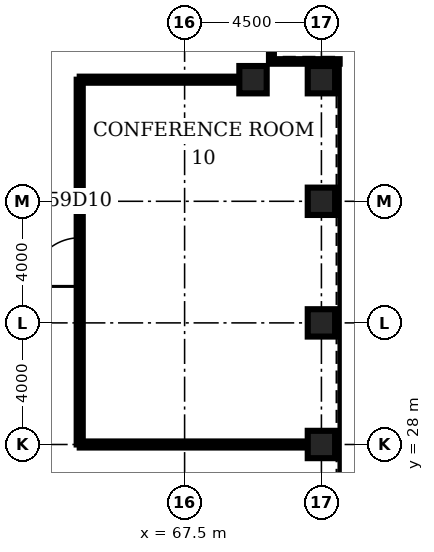
"""IFC4 building model, lengths in metres.
Left out: names, types, materials, properties, quantities, classifications, styles, units other than length and angle.
Written with IfcOpenShell. Run it as: python <this file> out.ifc"""

import sys

from ifc_helpers import new_model, si_unit, direction, frame, frame_2d, origin, origin_2d, place, context, subcontext, project, spatial, rectangle, hollow_rectangle, extrude, element, fill, save


model = new_model("IFC4")
c1 = context("Model", 3, precision=1e-05, world=origin(), true_north=direction((0.0, 1.0)))
c2 = subcontext(c1, "Body", "Model", "MODEL_VIEW")
j1 = project(units=[si_unit("LENGTHUNIT", "METRE"), si_unit("PLANEANGLEUNIT", "RADIAN")], contexts=[c1])
p1 = place(None, origin())
s1 = spatial("IfcSite", under=j1, at=p1, CompositionType="ELEMENT")
p2 = place(p1, origin())
s2 = spatial("IfcBuilding", under=s1, at=p2, CompositionType="ELEMENT")
p3 = place(p2, frame((0.0, 0.0, 261.4)))
s3 = spatial("IfcBuildingStorey", under=s2, at=p3, CompositionType="ELEMENT", Elevation=261.4)
for number, where, z_axis, x_axis in (
    (1, (72.0, 28.0, 0.0), (0.0, 0.0, 1.0), (1.0, 0.0, 0.0)),
    (2, (72.0, 32.0, 0.0), (0.0, 0.0, 1.0), (1.0, 0.0, 0.0)),
    (3, (72.0, 36.0, 0.0), (0.0, 0.0, 1.0), (1.0, 0.0, 0.0)),
    (4, (72.0, 40.0, 0.0), (0.0, 0.0, 1.0), (1.0, 0.0, 0.0)),
    (5, (69.75, 40.0, 0.0), (0.0, 0.0, 1.0), (1.0, 0.0, 0.0)),
):
    element("IfcColumn", number, at=place(p3, frame(where, z_axis=z_axis, x_axis=x_axis)), inside=s3, PredefinedType="COLUMN", context=c2, shape_type="SweptSolid", body=[
        extrude(hollow_rectangle(XDim=0.9, YDim=0.9, WallThickness=0.07, at=origin_2d()), origin(), (0.0, 0.0, 1.0), 4.2),
    ])
p4 = place(p3, frame((64.05, 28.0, 0.0), z_axis=(0.0, 0.0, 1.0), x_axis=(1.0, 0.0, 0.0)))
e6 = element("IfcWall", 6, at=p4, inside=s3, PredefinedType="PARTITIONING", context=c2, shape_type="SweptSolid", body=[
    extrude(rectangle(XDim=7.5, YDim=0.2, at=frame_2d((3.75, 0.0))), origin(), (0.0, 0.0, 1.0), 3.0),
])
p5 = place(p3, frame((64.05, 40.0, 0.0), z_axis=(0.0, 0.0, 1.0), x_axis=(1.0, 0.0, 0.0)))
e7 = element("IfcWall", 7, at=p5, inside=s3, PredefinedType="PARTITIONING", context=c2, shape_type="SweptSolid", body=[
    extrude(rectangle(XDim=5.25, YDim=0.2, at=frame_2d((2.625, 0.0))), origin(), (0.0, 0.0, 1.0), 3.0),
])
p6 = place(p3, frame((64.05, 28.0, 0.0), z_axis=(0.0, 0.0, 1.0), x_axis=(0.0, 1.0, 0.0)))
e8 = element("IfcWall", 8, at=p6, inside=s3, PredefinedType="PARTITIONING", context=c2, shape_type="SweptSolid", body=[
    extrude(rectangle(XDim=12.0, YDim=0.2, at=frame_2d((6.0, 0.0))), origin(), (0.0, 0.0, 1.0), 3.0),
])
p7 = place(p6, frame((5.2, 0.0, 0.0)))
e9 = element("IfcOpeningElement", 9, at=p7, cuts=e8, PredefinedType="OPENING", context=c2, shape_type="SweptSolid", body=[
    extrude(rectangle(XDim=1.6, YDim=2.1, at=frame_2d((0.8, 1.05))), frame((0.0, 0.11, 0.0), z_axis=(0.0, -1.0, 0.0), x_axis=(1.0, 0.0, 0.0)), (0.0, 0.0, 1.0), 0.22),
])
p8 = place(p3, frame((72.6, 40.6, 0.0), z_axis=(0.0, 0.0, 1.0), x_axis=(-1.0, 0.0, 0.0)))
e10 = element("IfcWall", 10, at=p8, inside=s3, PredefinedType="ELEMENTEDWALL", context=c2, shape_type="SweptSolid", body=[
    extrude(rectangle(XDim=2.25, YDim=0.15, at=frame_2d((1.125, 0.0))), origin(), (0.0, 0.0, 1.0), 3.95),
])
p9 = place(p3, frame((70.35, 40.6, 0.0), z_axis=(0.0, 0.0, 1.0), x_axis=(0.0, 1.0, 0.0)))
e11 = element("IfcWall", 11, at=p9, inside=s3, PredefinedType="ELEMENTEDWALL", context=c2, shape_type="SweptSolid", body=[
    extrude(rectangle(XDim=2.0, YDim=0.15, at=frame_2d((1.0, 0.0))), origin(), (0.0, 0.0, 1.0), 3.95),
])
p10 = place(p7, origin())
e12 = element("IfcDoor", 12, at=p10, inside=s3, OperationType="SINGLE_SWING_LEFT", PredefinedType="DOOR", context=c2, shape_type="SweptSolid", body=[
    extrude(rectangle(XDim=1.6, YDim=2.1, at=frame_2d((0.8, 1.05))), frame((0.0, 0.025, 0.0), z_axis=(0.0, -1.0, 0.0), x_axis=(1.0, 0.0, 0.0)), (0.0, 0.0, 1.0), 0.05),
])
fill(e9, e12)
save(model, sys.argv[1])
